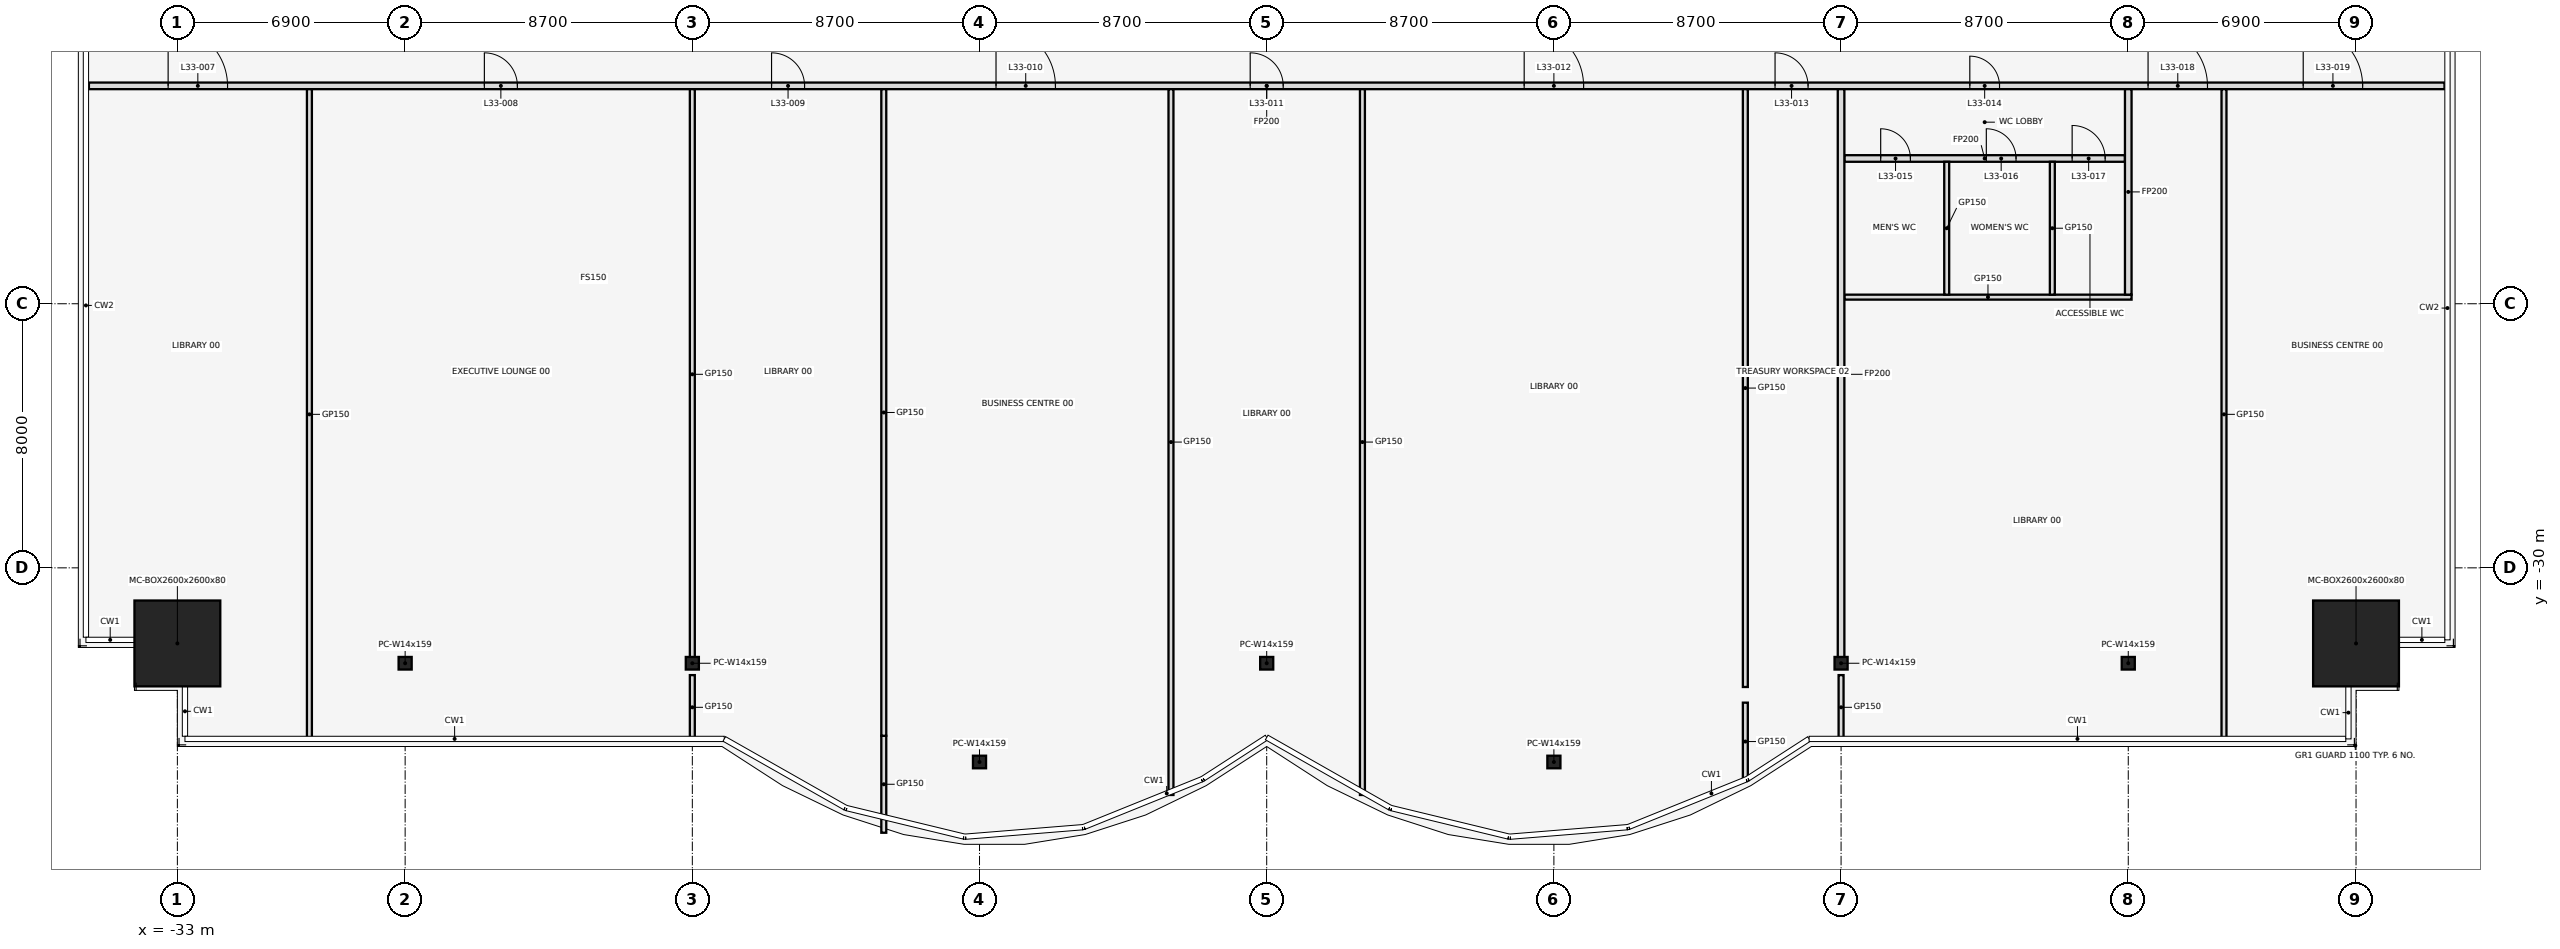
"""IFC4 building model, lengths in metres.
Left out: names, types, materials, properties, quantities, classifications, styles, units other than length and angle.
Written with IfcOpenShell. Run it as: python <this file> out.ifc"""

import sys

from ifc_helpers import new_model, si_unit, direction, frame, frame_2d, origin, origin_2d, place, context, subcontext, project, spatial, rectangle, hollow_rectangle, i_section, extrude, element, fill, save


model = new_model("IFC4")
c1 = context("Model", 3, precision=1e-05, world=origin(), true_north=direction((0.0, 1.0)))
c2 = subcontext(c1, "Body", "Model", "MODEL_VIEW")
j1 = project(units=[si_unit("LENGTHUNIT", "METRE"), si_unit("PLANEANGLEUNIT", "RADIAN")], contexts=[c1])
p1 = place(None, origin())
s1 = spatial("IfcSite", under=j1, at=p1, CompositionType="ELEMENT")
p2 = place(p1, origin())
s2 = spatial("IfcBuilding", under=s1, at=p2, CompositionType="ELEMENT")
p3 = place(p2, frame((0.0, 0.0, 152.7)))
s3 = spatial("IfcBuildingStorey", under=s2, at=p3, CompositionType="ELEMENT", Elevation=152.7)
p4 = place(p3, frame((-33.0, -32.29, 0.0), z_axis=(0.0, 0.0, 1.0), x_axis=(1.0, 0.0, 0.0)))
e1 = element("IfcColumn", 1, at=p4, inside=s3, PredefinedType="COLUMN", context=c2, shape_type="SweptSolid", body=[
    extrude(hollow_rectangle(XDim=2.6, YDim=2.6, WallThickness=0.08, at=origin_2d()), origin(), (0.0, 0.0, 1.0), 4.1),
])
for number, where, z_axis, x_axis in (
    (2, (-26.1, -32.89, 0.0), (0.0, 0.0, 1.0), (1.0, 0.0, 0.0)),
    (3, (-17.4, -32.89, 0.0), (0.0, 0.0, 1.0), (1.0, 0.0, 0.0)),
    (4, (-8.7, -35.881, 0.0), (0.0, 0.0, 1.0), (1.0, 0.0, 0.0)),
    (5, (0.0, -32.89, 0.0), (0.0, 0.0, 1.0), (1.0, 0.0, 0.0)),
    (6, (8.7, -35.881, 0.0), (0.0, 0.0, 1.0), (1.0, 0.0, 0.0)),
    (7, (17.4, -32.89, 0.0), (0.0, 0.0, 1.0), (1.0, 0.0, 0.0)),
    (8, (26.1, -32.89, 0.0), (0.0, 0.0, 1.0), (1.0, 0.0, 0.0)),
):
    element("IfcColumn", number, at=place(p3, frame(where, z_axis=z_axis, x_axis=x_axis)), inside=s3, PredefinedType="COLUMN", context=c2, shape_type="SweptSolid", body=[
        extrude(i_section(OverallWidth=0.396, OverallDepth=0.381, WebThickness=0.019, FlangeThickness=0.03, at=origin_2d()), origin(), (0.0, 0.0, 1.0), 4.1),
    ])
p5 = place(p3, frame((33.0, -32.29, 0.0), z_axis=(0.0, 0.0, 1.0), x_axis=(1.0, 0.0, 0.0)))
e9 = element("IfcColumn", 9, at=p5, inside=s3, PredefinedType="COLUMN", context=c2, shape_type="SweptSolid", body=[
    extrude(hollow_rectangle(XDim=2.6, YDim=2.6, WallThickness=0.08, at=origin_2d()), origin(), (0.0, 0.0, 1.0), 4.1),
])
p6 = place(p3, frame((17.5, -21.8, 0.0), z_axis=(0.0, 0.0, 1.0), x_axis=(1.0, 0.0, 0.0)))
e10 = element("IfcWall", 10, at=p6, inside=s3, PredefinedType="PARTITIONING", context=c2, shape_type="SweptSolid", body=[
    extrude(rectangle(XDim=8.7, YDim=0.15, at=frame_2d((4.35, 0.0))), origin(), (0.0, 0.0, 1.0), 2.84),
])
p7 = place(p3, frame((17.5, -17.6, 0.0), z_axis=(0.0, 0.0, 1.0), x_axis=(1.0, 0.0, 0.0)))
e11 = element("IfcWall", 11, at=p7, inside=s3, PredefinedType="PARTITIONING", context=c2, shape_type="SweptSolid", body=[
    extrude(rectangle(XDim=8.5, YDim=0.2, at=frame_2d((4.25, 0.0))), origin(), (0.0, 0.0, 1.0), 2.84),
])
p8 = place(p7, frame((1.1, 0.0, 0.0)))
e12 = element("IfcOpeningElement", 12, at=p8, cuts=e11, PredefinedType="OPENING", context=c2, shape_type="SweptSolid", body=[
    extrude(rectangle(XDim=0.9, YDim=2.1, at=frame_2d((0.45, 1.05))), frame((0.0, 0.112, 0.0), z_axis=(0.0, -1.0, 0.0), x_axis=(1.0, 0.0, 0.0)), (0.0, 0.0, 1.0), 0.224),
])
p9 = place(p7, frame((4.3, 0.0, 0.0)))
e13 = element("IfcOpeningElement", 13, at=p9, cuts=e11, PredefinedType="OPENING", context=c2, shape_type="SweptSolid", body=[
    extrude(rectangle(XDim=0.9, YDim=2.1, at=frame_2d((0.45, 1.05))), frame((0.0, 0.112, 0.0), z_axis=(0.0, -1.0, 0.0), x_axis=(1.0, 0.0, 0.0)), (0.0, 0.0, 1.0), 0.224),
])
p10 = place(p7, frame((6.9, 0.0, 0.0)))
e14 = element("IfcOpeningElement", 14, at=p10, cuts=e11, PredefinedType="OPENING", context=c2, shape_type="SweptSolid", body=[
    extrude(rectangle(XDim=1.0, YDim=2.1, at=frame_2d((0.5, 1.05))), frame((0.0, 0.112, 0.0), z_axis=(0.0, -1.0, 0.0), x_axis=(1.0, 0.0, 0.0)), (0.0, 0.0, 1.0), 0.224),
])
p11 = place(p3, frame((-35.68, -15.4, 0.0), z_axis=(0.0, 0.0, 1.0), x_axis=(1.0, 0.0, 0.0)))
e15 = element("IfcWall", 15, at=p11, inside=s3, PredefinedType="PARTITIONING", context=c2, shape_type="SweptSolid", body=[
    extrude(rectangle(XDim=71.36, YDim=0.2, at=frame_2d((35.68, 0.0))), origin(), (0.0, 0.0, 1.0), 2.84),
])
p12 = place(p11, frame((2.4, 0.0, 0.0)))
e16 = element("IfcOpeningElement", 16, at=p12, cuts=e15, PredefinedType="OPENING", context=c2, shape_type="SweptSolid", body=[
    extrude(rectangle(XDim=1.8, YDim=2.1, at=frame_2d((0.9, 1.05))), frame((0.0, 0.112, 0.0), z_axis=(0.0, -1.0, 0.0), x_axis=(1.0, 0.0, 0.0)), (0.0, 0.0, 1.0), 0.224),
])
p13 = place(p11, frame((11.98, 0.0, 0.0)))
e17 = element("IfcOpeningElement", 17, at=p13, cuts=e15, PredefinedType="OPENING", context=c2, shape_type="SweptSolid", body=[
    extrude(rectangle(XDim=1.0, YDim=2.1, at=frame_2d((0.5, 1.05))), frame((0.0, 0.112, 0.0), z_axis=(0.0, -1.0, 0.0), x_axis=(1.0, 0.0, 0.0)), (0.0, 0.0, 1.0), 0.224),
])
p14 = place(p11, frame((20.68, 0.0, 0.0)))
e18 = element("IfcOpeningElement", 18, at=p14, cuts=e15, PredefinedType="OPENING", context=c2, shape_type="SweptSolid", body=[
    extrude(rectangle(XDim=1.0, YDim=2.1, at=frame_2d((0.5, 1.05))), frame((0.0, 0.112, 0.0), z_axis=(0.0, -1.0, 0.0), x_axis=(1.0, 0.0, 0.0)), (0.0, 0.0, 1.0), 0.224),
])
p15 = place(p11, frame((27.48, 0.0, 0.0)))
e19 = element("IfcOpeningElement", 19, at=p15, cuts=e15, PredefinedType="OPENING", context=c2, shape_type="SweptSolid", body=[
    extrude(rectangle(XDim=1.8, YDim=2.1, at=frame_2d((0.9, 1.05))), frame((0.0, 0.112, 0.0), z_axis=(0.0, -1.0, 0.0), x_axis=(1.0, 0.0, 0.0)), (0.0, 0.0, 1.0), 0.224),
])
p16 = place(p11, frame((35.18, 0.0, 0.0)))
e20 = element("IfcOpeningElement", 20, at=p16, cuts=e15, PredefinedType="OPENING", context=c2, shape_type="SweptSolid", body=[
    extrude(rectangle(XDim=1.0, YDim=2.1, at=frame_2d((0.5, 1.05))), frame((0.0, 0.112, 0.0), z_axis=(0.0, -1.0, 0.0), x_axis=(1.0, 0.0, 0.0)), (0.0, 0.0, 1.0), 0.224),
])
p17 = place(p11, frame((43.48, 0.0, 0.0)))
e21 = element("IfcOpeningElement", 21, at=p17, cuts=e15, PredefinedType="OPENING", context=c2, shape_type="SweptSolid", body=[
    extrude(rectangle(XDim=1.8, YDim=2.1, at=frame_2d((0.9, 1.05))), frame((0.0, 0.112, 0.0), z_axis=(0.0, -1.0, 0.0), x_axis=(1.0, 0.0, 0.0)), (0.0, 0.0, 1.0), 0.224),
])
p18 = place(p11, frame((51.08, 0.0, 0.0)))
e22 = element("IfcOpeningElement", 22, at=p18, cuts=e15, PredefinedType="OPENING", context=c2, shape_type="SweptSolid", body=[
    extrude(rectangle(XDim=1.0, YDim=2.1, at=frame_2d((0.5, 1.05))), frame((0.0, 0.112, 0.0), z_axis=(0.0, -1.0, 0.0), x_axis=(1.0, 0.0, 0.0)), (0.0, 0.0, 1.0), 0.224),
])
p19 = place(p11, frame((56.98, 0.0, 0.0)))
e23 = element("IfcOpeningElement", 23, at=p19, cuts=e15, PredefinedType="OPENING", context=c2, shape_type="SweptSolid", body=[
    extrude(rectangle(XDim=0.9, YDim=2.1, at=frame_2d((0.45, 1.05))), frame((0.0, 0.112, 0.0), z_axis=(0.0, -1.0, 0.0), x_axis=(1.0, 0.0, 0.0)), (0.0, 0.0, 1.0), 0.224),
])
p20 = place(p11, frame((62.38, 0.0, 0.0)))
e24 = element("IfcOpeningElement", 24, at=p20, cuts=e15, PredefinedType="OPENING", context=c2, shape_type="SweptSolid", body=[
    extrude(rectangle(XDim=1.8, YDim=2.1, at=frame_2d((0.9, 1.05))), frame((0.0, 0.112, 0.0), z_axis=(0.0, -1.0, 0.0), x_axis=(1.0, 0.0, 0.0)), (0.0, 0.0, 1.0), 0.224),
])
p21 = place(p11, frame((67.08, 0.0, 0.0)))
e25 = element("IfcOpeningElement", 25, at=p21, cuts=e15, PredefinedType="OPENING", context=c2, shape_type="SweptSolid", body=[
    extrude(rectangle(XDim=1.8, YDim=2.1, at=frame_2d((0.9, 1.05))), frame((0.0, 0.112, 0.0), z_axis=(0.0, -1.0, 0.0), x_axis=(1.0, 0.0, 0.0)), (0.0, 0.0, 1.0), 0.224),
])
p22 = place(p3, frame((-29.0, -35.2, 0.0), z_axis=(0.0, 0.0, 1.0), x_axis=(0.0, 1.0, 0.0)))
e26 = element("IfcWall", 26, at=p22, inside=s3, PredefinedType="PARTITIONING", context=c2, shape_type="SweptSolid", body=[
    extrude(rectangle(XDim=19.7, YDim=0.15, at=frame_2d((9.85, 0.0))), origin(), (0.0, 0.0, 1.0), 2.84),
])
p23 = place(p3, frame((-17.4, -35.2, 0.0), z_axis=(0.0, 0.0, 1.0), x_axis=(0.0, 1.0, 0.0)))
e27 = element("IfcWall", 27, at=p23, inside=s3, PredefinedType="PARTITIONING", context=c2, shape_type="SweptSolid", body=[
    extrude(rectangle(XDim=1.951, YDim=0.15, at=frame_2d((0.975, 0.0))), origin(), (0.0, 0.0, 1.0), 2.84),
])
p24 = place(p3, frame((-17.4, -32.775, 0.0), z_axis=(0.0, 0.0, 1.0), x_axis=(0.0, 1.0, 0.0)))
e28 = element("IfcWall", 28, at=p24, inside=s3, PredefinedType="PARTITIONING", context=c2, shape_type="SweptSolid", body=[
    extrude(rectangle(XDim=17.275, YDim=0.15, at=frame_2d((8.637, 0.0))), origin(), (0.0, 0.0, 1.0), 2.84),
])
p25 = place(p3, frame((-11.6, -38.024, 0.0), z_axis=(0.0, 0.0, 1.0), x_axis=(0.0, 1.0, 0.0)))
e29 = element("IfcWall", 29, at=p25, inside=s3, PredefinedType="PARTITIONING", context=c2, shape_type="SweptSolid", body=[
    extrude(rectangle(XDim=2.937, YDim=0.15, at=frame_2d((1.469, 0.0))), origin(), (0.0, 0.0, 1.0), 2.84),
])
p26 = place(p3, frame((-11.6, -35.087, 0.0), z_axis=(0.0, 0.0, 1.0), x_axis=(0.0, 1.0, 0.0)))
e30 = element("IfcWall", 30, at=p26, inside=s3, PredefinedType="PARTITIONING", context=c2, shape_type="SweptSolid", body=[
    extrude(rectangle(XDim=19.587, YDim=0.15, at=frame_2d((9.793, 0.0))), origin(), (0.0, 0.0, 1.0), 2.84),
])
for number, where, z_axis, x_axis in (
    (31, (-2.9, -36.88, 0.0), (0.0, 0.0, 1.0), (0.0, 1.0, 0.0)),
    (32, (2.9, -36.88, 0.0), (0.0, 0.0, 1.0), (0.0, 1.0, 0.0)),
):
    element("IfcWall", number, at=place(p3, frame(where, z_axis=z_axis, x_axis=x_axis)), inside=s3, PredefinedType="PARTITIONING", context=c2, shape_type="SweptSolid", body=[
        extrude(rectangle(XDim=21.38, YDim=0.15, at=frame_2d((10.69, 0.0))), origin(), (0.0, 0.0, 1.0), 2.84),
    ])
p27 = place(p3, frame((14.5, -36.44, 0.0), z_axis=(0.0, 0.0, 1.0), x_axis=(0.0, 1.0, 0.0)))
e33 = element("IfcWall", 33, at=p27, inside=s3, PredefinedType="PARTITIONING", context=c2, shape_type="SweptSolid", body=[
    extrude(rectangle(XDim=2.356, YDim=0.15, at=frame_2d((1.178, 0.0))), origin(), (0.0, 0.0, 1.0), 2.84),
])
p28 = place(p3, frame((14.5, -33.609, 0.0), z_axis=(0.0, 0.0, 1.0), x_axis=(0.0, 1.0, 0.0)))
e34 = element("IfcWall", 34, at=p28, inside=s3, PredefinedType="PARTITIONING", context=c2, shape_type="SweptSolid", body=[
    extrude(rectangle(XDim=18.109, YDim=0.15, at=frame_2d((9.054, 0.0))), origin(), (0.0, 0.0, 1.0), 2.84),
])
p29 = place(p3, frame((17.4, -35.2, 0.0), z_axis=(0.0, 0.0, 1.0), x_axis=(0.0, 1.0, 0.0)))
e35 = element("IfcWall", 35, at=p29, inside=s3, PredefinedType="PARTITIONING", context=c2, shape_type="SweptSolid", body=[
    extrude(rectangle(XDim=1.951, YDim=0.15, at=frame_2d((0.975, 0.0))), origin(), (0.0, 0.0, 1.0), 2.84),
])
p30 = place(p3, frame((17.4, -32.775, 0.0), z_axis=(0.0, 0.0, 1.0), x_axis=(0.0, 1.0, 0.0)))
e36 = element("IfcWall", 36, at=p30, inside=s3, PredefinedType="PARTITIONING", context=c2, shape_type="SweptSolid", body=[
    extrude(rectangle(XDim=17.275, YDim=0.2, at=frame_2d((8.637, 0.0))), origin(), (0.0, 0.0, 1.0), 2.84),
])
for number, where, z_axis, x_axis in (
    (37, (20.6, -21.725, 0.0), (0.0, 0.0, 1.0), (0.0, 1.0, 0.0)),
    (38, (23.8, -21.725, 0.0), (0.0, 0.0, 1.0), (0.0, 1.0, 0.0)),
):
    element("IfcWall", number, at=place(p3, frame(where, z_axis=z_axis, x_axis=x_axis)), inside=s3, PredefinedType="PARTITIONING", context=c2, shape_type="SweptSolid", body=[
        extrude(rectangle(XDim=4.025, YDim=0.15, at=frame_2d((2.013, 0.0))), origin(), (0.0, 0.0, 1.0), 2.84),
    ])
p31 = place(p3, frame((26.1, -21.725, 0.0), z_axis=(0.0, 0.0, 1.0), x_axis=(0.0, 1.0, 0.0)))
e39 = element("IfcWall", 39, at=p31, inside=s3, PredefinedType="PARTITIONING", context=c2, shape_type="SweptSolid", body=[
    extrude(rectangle(XDim=6.225, YDim=0.2, at=frame_2d((3.113, 0.0))), origin(), (0.0, 0.0, 1.0), 2.84),
])
p32 = place(p3, frame((29.0, -35.2, 0.0), z_axis=(0.0, 0.0, 1.0), x_axis=(0.0, 1.0, 0.0)))
e40 = element("IfcWall", 40, at=p32, inside=s3, PredefinedType="PARTITIONING", context=c2, shape_type="SweptSolid", body=[
    extrude(rectangle(XDim=19.7, YDim=0.15, at=frame_2d((9.85, 0.0))), origin(), (0.0, 0.0, 1.0), 2.84),
])
p33 = place(p12, origin())
e41 = element("IfcDoor", 41, at=p33, inside=s3, OperationType="SINGLE_SWING_LEFT", PredefinedType="DOOR", context=c2, shape_type="SweptSolid", body=[
    extrude(rectangle(XDim=1.8, YDim=2.1, at=frame_2d((0.9, 1.05))), frame((0.0, 0.025, 0.0), z_axis=(0.0, -1.0, 0.0), x_axis=(1.0, 0.0, 0.0)), (0.0, 0.0, 1.0), 0.05),
])
fill(e16, e41)
p34 = place(p13, frame((1.0, 0.0, 0.0), z_axis=(0.0, 0.0, 1.0), x_axis=(-1.0, 0.0, 0.0)))
e42 = element("IfcDoor", 42, at=p34, inside=s3, OperationType="SINGLE_SWING_RIGHT", PredefinedType="DOOR", context=c2, shape_type="SweptSolid", body=[
    extrude(rectangle(XDim=1.0, YDim=2.1, at=frame_2d((0.5, 1.05))), frame((0.0, 0.025, 0.0), z_axis=(0.0, -1.0, 0.0), x_axis=(1.0, 0.0, 0.0)), (0.0, 0.0, 1.0), 0.05),
])
fill(e17, e42)
p35 = place(p14, frame((1.0, 0.0, 0.0), z_axis=(0.0, 0.0, 1.0), x_axis=(-1.0, 0.0, 0.0)))
e43 = element("IfcDoor", 43, at=p35, inside=s3, OperationType="SINGLE_SWING_RIGHT", PredefinedType="DOOR", context=c2, shape_type="SweptSolid", body=[
    extrude(rectangle(XDim=1.0, YDim=2.1, at=frame_2d((0.5, 1.05))), frame((0.0, 0.025, 0.0), z_axis=(0.0, -1.0, 0.0), x_axis=(1.0, 0.0, 0.0)), (0.0, 0.0, 1.0), 0.05),
])
fill(e18, e43)
p36 = place(p15, origin())
e44 = element("IfcDoor", 44, at=p36, inside=s3, OperationType="SINGLE_SWING_LEFT", PredefinedType="DOOR", context=c2, shape_type="SweptSolid", body=[
    extrude(rectangle(XDim=1.8, YDim=2.1, at=frame_2d((0.9, 1.05))), frame((0.0, 0.025, 0.0), z_axis=(0.0, -1.0, 0.0), x_axis=(1.0, 0.0, 0.0)), (0.0, 0.0, 1.0), 0.05),
])
fill(e19, e44)
p37 = place(p16, frame((1.0, 0.0, 0.0), z_axis=(0.0, 0.0, 1.0), x_axis=(-1.0, 0.0, 0.0)))
e45 = element("IfcDoor", 45, at=p37, inside=s3, OperationType="SINGLE_SWING_RIGHT", PredefinedType="DOOR", context=c2, shape_type="SweptSolid", body=[
    extrude(rectangle(XDim=1.0, YDim=2.1, at=frame_2d((0.5, 1.05))), frame((0.0, 0.025, 0.0), z_axis=(0.0, -1.0, 0.0), x_axis=(1.0, 0.0, 0.0)), (0.0, 0.0, 1.0), 0.05),
])
fill(e20, e45)
p38 = place(p17, origin())
e46 = element("IfcDoor", 46, at=p38, inside=s3, OperationType="SINGLE_SWING_LEFT", PredefinedType="DOOR", context=c2, shape_type="SweptSolid", body=[
    extrude(rectangle(XDim=1.8, YDim=2.1, at=frame_2d((0.9, 1.05))), frame((0.0, 0.025, 0.0), z_axis=(0.0, -1.0, 0.0), x_axis=(1.0, 0.0, 0.0)), (0.0, 0.0, 1.0), 0.05),
])
fill(e21, e46)
p39 = place(p18, frame((1.0, 0.0, 0.0), z_axis=(0.0, 0.0, 1.0), x_axis=(-1.0, 0.0, 0.0)))
e47 = element("IfcDoor", 47, at=p39, inside=s3, OperationType="SINGLE_SWING_LEFT", PredefinedType="DOOR", context=c2, shape_type="SweptSolid", body=[
    extrude(rectangle(XDim=1.0, YDim=2.1, at=frame_2d((0.5, 1.05))), frame((0.0, 0.025, 0.0), z_axis=(0.0, -1.0, 0.0), x_axis=(1.0, 0.0, 0.0)), (0.0, 0.0, 1.0), 0.05),
])
fill(e22, e47)
p40 = place(p19, frame((0.9, 0.0, 0.0), z_axis=(0.0, 0.0, 1.0), x_axis=(-1.0, 0.0, 0.0)))
e48 = element("IfcDoor", 48, at=p40, inside=s3, OperationType="SINGLE_SWING_RIGHT", PredefinedType="DOOR", context=c2, shape_type="SweptSolid", body=[
    extrude(rectangle(XDim=0.9, YDim=2.1, at=frame_2d((0.45, 1.05))), frame((0.0, 0.025, 0.0), z_axis=(0.0, -1.0, 0.0), x_axis=(1.0, 0.0, 0.0)), (0.0, 0.0, 1.0), 0.05),
])
fill(e23, e48)
p41 = place(p8, frame((0.9, 0.0, 0.0), z_axis=(0.0, 0.0, 1.0), x_axis=(-1.0, 0.0, 0.0)))
e49 = element("IfcDoor", 49, at=p41, inside=s3, OperationType="SINGLE_SWING_RIGHT", PredefinedType="DOOR", context=c2, shape_type="SweptSolid", body=[
    extrude(rectangle(XDim=0.9, YDim=2.1, at=frame_2d((0.45, 1.05))), frame((0.0, 0.025, 0.0), z_axis=(0.0, -1.0, 0.0), x_axis=(1.0, 0.0, 0.0)), (0.0, 0.0, 1.0), 0.05),
])
fill(e12, e49)
p42 = place(p9, frame((0.9, 0.0, 0.0), z_axis=(0.0, 0.0, 1.0), x_axis=(-1.0, 0.0, 0.0)))
e50 = element("IfcDoor", 50, at=p42, inside=s3, OperationType="SINGLE_SWING_LEFT", PredefinedType="DOOR", context=c2, shape_type="SweptSolid", body=[
    extrude(rectangle(XDim=0.9, YDim=2.1, at=frame_2d((0.45, 1.05))), frame((0.0, 0.025, 0.0), z_axis=(0.0, -1.0, 0.0), x_axis=(1.0, 0.0, 0.0)), (0.0, 0.0, 1.0), 0.05),
])
fill(e13, e50)
p43 = place(p10, frame((1.0, 0.0, 0.0), z_axis=(0.0, 0.0, 1.0), x_axis=(-1.0, 0.0, 0.0)))
e51 = element("IfcDoor", 51, at=p43, inside=s3, OperationType="SINGLE_SWING_RIGHT", PredefinedType="DOOR", context=c2, shape_type="SweptSolid", body=[
    extrude(rectangle(XDim=1.0, YDim=2.1, at=frame_2d((0.5, 1.05))), frame((0.0, 0.025, 0.0), z_axis=(0.0, -1.0, 0.0), x_axis=(1.0, 0.0, 0.0)), (0.0, 0.0, 1.0), 0.05),
])
fill(e14, e51)
p44 = place(p20, origin())
e52 = element("IfcDoor", 52, at=p44, inside=s3, OperationType="SINGLE_SWING_LEFT", PredefinedType="DOOR", context=c2, shape_type="SweptSolid", body=[
    extrude(rectangle(XDim=1.8, YDim=2.1, at=frame_2d((0.9, 1.05))), frame((0.0, 0.025, 0.0), z_axis=(0.0, -1.0, 0.0), x_axis=(1.0, 0.0, 0.0)), (0.0, 0.0, 1.0), 0.05),
])
fill(e24, e52)
p45 = place(p21, origin())
e53 = element("IfcDoor", 53, at=p45, inside=s3, OperationType="SINGLE_SWING_LEFT", PredefinedType="DOOR", context=c2, shape_type="SweptSolid", body=[
    extrude(rectangle(XDim=1.8, YDim=2.1, at=frame_2d((0.9, 1.05))), frame((0.0, 0.025, 0.0), z_axis=(0.0, -1.0, 0.0), x_axis=(1.0, 0.0, 0.0)), (0.0, 0.0, 1.0), 0.05),
])
fill(e25, e53)
save(model, sys.argv[1])
